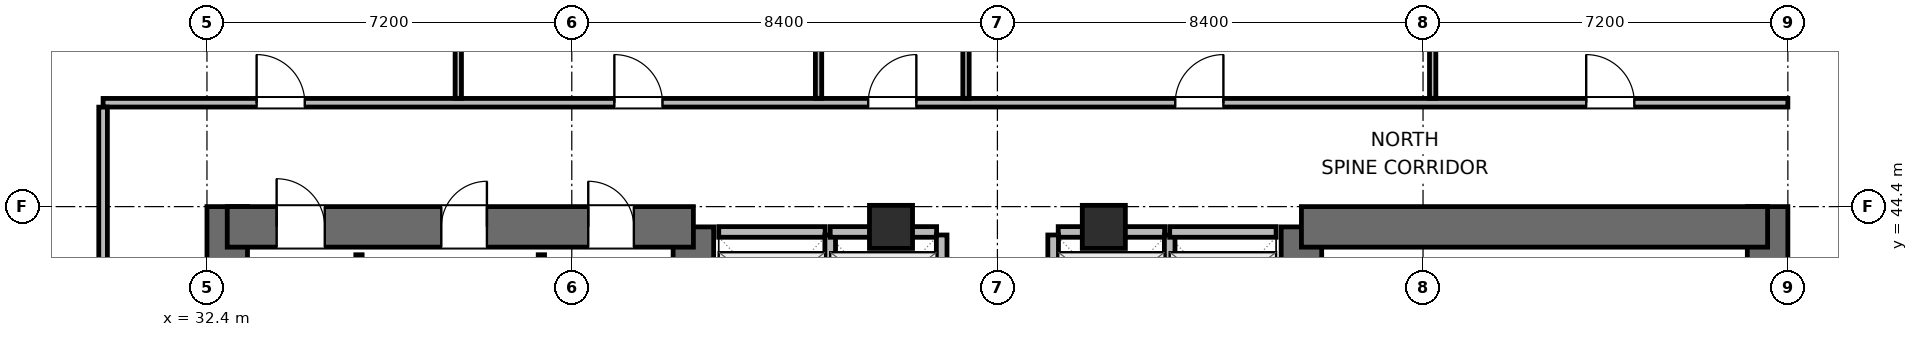
"""IFC4 building model, lengths in metres.
Left out: names, types, materials, properties, quantities, classifications, styles, units other than length and angle.
Written with IfcOpenShell. Run it as: python <this file> out.ifc"""

import sys

from ifc_helpers import new_model, si_unit, direction, frame, frame_2d, origin, origin_2d, place, context, subcontext, project, spatial, rectangle, extrude, element, fill, save


model = new_model("IFC4")
c1 = context("Model", 3, precision=1e-05, world=origin(), true_north=direction((0.0, 1.0)))
c2 = subcontext(c1, "Body", "Model", "MODEL_VIEW")
j1 = project(units=[si_unit("LENGTHUNIT", "METRE"), si_unit("PLANEANGLEUNIT", "RADIAN")], contexts=[c1])
p1 = place(None, origin())
s1 = spatial("IfcSite", under=j1, at=p1, CompositionType="ELEMENT")
p2 = place(p1, origin())
s2 = spatial("IfcBuilding", under=s1, at=p2, CompositionType="ELEMENT")
p3 = place(p2, frame((0.0, 0.0, 133.8)))
s3 = spatial("IfcBuildingStorey", under=s2, at=p3, CompositionType="ELEMENT", Elevation=133.8)
p4 = place(p3, frame((32.8, 27.6, 0.0), z_axis=(0.0, 0.0, 1.0), x_axis=(0.0, 1.0, 0.0)))
e1 = element("IfcWall", 1, at=p4, inside=s3, PredefinedType="SHEAR", context=c2, shape_type="SweptSolid", body=[
    extrude(rectangle(XDim=16.8, YDim=0.8, at=frame_2d((8.4, 0.0))), origin(), (0.0, 0.0, 1.0), 3.9),
])
p5 = place(p3, frame((42.0, 37.8, 0.0), z_axis=(0.0, 0.0, 1.0), x_axis=(0.0, 1.0, 0.0)))
e2 = element("IfcWall", 2, at=p5, inside=s3, PredefinedType="SHEAR", context=c2, shape_type="SweptSolid", body=[
    extrude(rectangle(XDim=6.2, YDim=0.8, at=frame_2d((3.1, 0.0))), origin(), (0.0, 0.0, 1.0), 3.9),
])
p6 = place(p3, frame((32.8, 44.0, 0.0), z_axis=(0.0, 0.0, 1.0), x_axis=(1.0, 0.0, 0.0)))
e3 = element("IfcWall", 3, at=p6, inside=s3, PredefinedType="SHEAR", context=c2, shape_type="SweptSolid", body=[
    extrude(rectangle(XDim=9.2, YDim=0.8, at=frame_2d((4.6, 0.0))), origin(), (0.0, 0.0, 1.0), 3.9),
])
p7 = place(p6, frame((0.975, 0.0, 0.0)))
e4 = element("IfcOpeningElement", 4, at=p7, cuts=e3, PredefinedType="OPENING", context=c2, shape_type="SweptSolid", body=[
    extrude(rectangle(XDim=0.95, YDim=2.04, at=frame_2d((0.475, 1.02))), frame((0.0, 0.41, 0.0), z_axis=(0.0, -1.0, 0.0), x_axis=(1.0, 0.0, 0.0)), (0.0, 0.0, 1.0), 0.82),
])
p8 = place(p6, frame((4.225, 0.0, 0.0)))
e5 = element("IfcOpeningElement", 5, at=p8, cuts=e3, PredefinedType="OPENING", context=c2, shape_type="SweptSolid", body=[
    extrude(rectangle(XDim=0.9, YDim=2.02, at=frame_2d((0.45, 1.01))), frame((0.0, 0.41, 0.0), z_axis=(0.0, -1.0, 0.0), x_axis=(1.0, 0.0, 0.0)), (0.0, 0.0, 1.0), 0.82),
])
p9 = place(p6, frame((7.125, 0.0, 0.0)))
e6 = element("IfcOpeningElement", 6, at=p9, cuts=e3, PredefinedType="OPENING", context=c2, shape_type="SweptSolid", body=[
    extrude(rectangle(XDim=0.9, YDim=2.02, at=frame_2d((0.45, 1.01))), frame((0.0, 0.41, 0.0), z_axis=(0.0, -1.0, 0.0), x_axis=(1.0, 0.0, 0.0)), (0.0, 0.0, 1.0), 0.82),
])
p10 = place(p3, frame((54.0, 38.0, 0.0), z_axis=(0.0, 0.0, 1.0), x_axis=(0.0, 1.0, 0.0)))
e7 = element("IfcWall", 7, at=p10, inside=s3, PredefinedType="SHEAR", context=c2, shape_type="SweptSolid", body=[
    extrude(rectangle(XDim=6.0, YDim=0.8, at=frame_2d((3.0, 0.0))), origin(), (0.0, 0.0, 1.0), 3.9),
])
p11 = place(p3, frame((63.2, 27.6, 0.0), z_axis=(0.0, 0.0, 1.0), x_axis=(0.0, 1.0, 0.0)))
e8 = element("IfcWall", 8, at=p11, inside=s3, PredefinedType="SHEAR", context=c2, shape_type="SweptSolid", body=[
    extrude(rectangle(XDim=16.8, YDim=0.8, at=frame_2d((8.4, 0.0))), origin(), (0.0, 0.0, 1.0), 3.9),
])
p12 = place(p3, frame((54.0, 44.0, 0.0), z_axis=(0.0, 0.0, 1.0), x_axis=(1.0, 0.0, 0.0)))
e9 = element("IfcWall", 9, at=p12, inside=s3, PredefinedType="SHEAR", context=c2, shape_type="SweptSolid", body=[
    extrude(rectangle(XDim=9.2, YDim=0.8, at=frame_2d((4.6, 0.0))), origin(), (0.0, 0.0, 1.0), 3.9),
])
for number, where, z_axis, x_axis in (
    (10, (45.9, 44.0, 0.0), (0.0, 0.0, 1.0), (1.0, 0.0, 0.0)),
    (11, (50.1, 44.0, 0.0), (0.0, 0.0, 1.0), (1.0, 0.0, 0.0)),
):
    element("IfcColumn", number, at=place(p3, frame(where, z_axis=z_axis, x_axis=x_axis)), inside=s3, PredefinedType="COLUMN", context=c2, shape_type="SweptSolid", body=[
        extrude(rectangle(XDim=0.85, YDim=0.85, at=origin_2d()), origin(), (0.0, 0.0, 1.0), 3.9),
    ])
for number, where, z_axis, x_axis in (
    (12, (35.4, 41.095, 0.0), (0.0, 0.0, 1.0), (0.0, 1.0, 0.0)),
    (13, (39.0, 41.095, 0.0), (0.0, 0.0, 1.0), (0.0, 1.0, 0.0)),
):
    element("IfcWall", number, at=place(p3, frame(where, z_axis=z_axis, x_axis=x_axis)), inside=s3, PredefinedType="PARTITIONING", context=c2, shape_type="SweptSolid", body=[
        extrude(rectangle(XDim=2.355, YDim=0.125, at=frame_2d((1.177, 0.0))), origin(), (0.0, 0.0, 1.0), 3.64),
    ])
p13 = place(p3, frame((42.5, 43.9, 0.0), z_axis=(0.0, 0.0, 1.0), x_axis=(1.0, 0.0, 0.0)))
e14 = element("IfcWall", 14, at=p13, inside=s3, PredefinedType="PARTITIONING", context=c2, shape_type="SweptSolid", body=[
    extrude(rectangle(XDim=2.1, YDim=0.21, at=frame_2d((1.05, 0.0))), origin(), (0.0, 0.0, 1.0), 2.525),
])
p14 = place(p3, frame((44.7, 41.56, 0.0), z_axis=(0.0, 0.0, 1.0), x_axis=(0.0, 1.0, 0.0)))
e15 = element("IfcWall", 15, at=p14, inside=s3, PredefinedType="PARTITIONING", context=c2, shape_type="SweptSolid", body=[
    extrude(rectangle(XDim=2.28, YDim=0.21, at=frame_2d((1.14, 0.0))), origin(), (0.0, 0.0, 1.0), 3.64),
])
p15 = place(p3, frame((44.7, 43.9, 0.0), z_axis=(0.0, 0.0, 1.0), x_axis=(1.0, 0.0, 0.0)))
e16 = element("IfcWall", 16, at=p15, inside=s3, PredefinedType="PARTITIONING", context=c2, shape_type="SweptSolid", body=[
    extrude(rectangle(XDim=2.1, YDim=0.21, at=frame_2d((1.05, 0.0))), origin(), (0.0, 0.0, 1.0), 2.525),
])
p16 = place(p3, frame((46.9, 41.56, 0.0), z_axis=(0.0, 0.0, 1.0), x_axis=(0.0, 1.0, 0.0)))
e17 = element("IfcWall", 17, at=p16, inside=s3, PredefinedType="PARTITIONING", context=c2, shape_type="SweptSolid", body=[
    extrude(rectangle(XDim=2.28, YDim=0.21, at=frame_2d((1.14, 0.0))), origin(), (0.0, 0.0, 1.0), 3.64),
])
p17 = place(p3, frame((49.2, 43.9, 0.0), z_axis=(0.0, 0.0, 1.0), x_axis=(1.0, 0.0, 0.0)))
e18 = element("IfcWall", 18, at=p17, inside=s3, PredefinedType="PARTITIONING", context=c2, shape_type="SweptSolid", body=[
    extrude(rectangle(XDim=2.1, YDim=0.21, at=frame_2d((1.05, 0.0))), origin(), (0.0, 0.0, 1.0), 2.525),
])
for number, where, z_axis, x_axis in (
    (19, (49.1, 41.56, 0.0), (0.0, 0.0, 1.0), (0.0, 1.0, 0.0)),
    (20, (51.4, 41.56, 0.0), (0.0, 0.0, 1.0), (0.0, 1.0, 0.0)),
):
    element("IfcWall", number, at=place(p3, frame(where, z_axis=z_axis, x_axis=x_axis)), inside=s3, PredefinedType="PARTITIONING", context=c2, shape_type="SweptSolid", body=[
        extrude(rectangle(XDim=2.28, YDim=0.21, at=frame_2d((1.14, 0.0))), origin(), (0.0, 0.0, 1.0), 3.64),
    ])
p18 = place(p3, frame((51.4, 43.9, 0.0), z_axis=(0.0, 0.0, 1.0), x_axis=(1.0, 0.0, 0.0)))
e21 = element("IfcWall", 21, at=p18, inside=s3, PredefinedType="PARTITIONING", context=c2, shape_type="SweptSolid", body=[
    extrude(rectangle(XDim=2.1, YDim=0.21, at=frame_2d((1.05, 0.0))), origin(), (0.0, 0.0, 1.0), 2.525),
])
p19 = place(p3, frame((30.35, 46.45, 0.0), z_axis=(0.0, 0.0, 1.0), x_axis=(1.0, 0.0, 0.0)))
e22 = element("IfcWall", 22, at=p19, inside=s3, PredefinedType="PARTITIONING", context=c2, shape_type="SweptSolid", body=[
    extrude(rectangle(XDim=33.25, YDim=0.17, at=frame_2d((16.625, 0.0))), origin(), (0.0, 0.0, 1.0), 3.64),
])
p20 = place(p19, frame((3.03, 0.0, 0.0)))
e23 = element("IfcOpeningElement", 23, at=p20, cuts=e22, PredefinedType="OPENING", context=c2, shape_type="SweptSolid", body=[
    extrude(rectangle(XDim=0.95, YDim=2.04, at=frame_2d((0.475, 1.02))), frame((0.0, 0.095, 0.0), z_axis=(0.0, -1.0, 0.0), x_axis=(1.0, 0.0, 0.0)), (0.0, 0.0, 1.0), 0.19),
])
p21 = place(p19, frame((10.09, 0.0, 0.0)))
e24 = element("IfcOpeningElement", 24, at=p21, cuts=e22, PredefinedType="OPENING", context=c2, shape_type="SweptSolid", body=[
    extrude(rectangle(XDim=0.95, YDim=2.04, at=frame_2d((0.475, 1.02))), frame((0.0, 0.095, 0.0), z_axis=(0.0, -1.0, 0.0), x_axis=(1.0, 0.0, 0.0)), (0.0, 0.0, 1.0), 0.19),
])
p22 = place(p19, frame((15.1, 0.0, 0.0)))
e25 = element("IfcOpeningElement", 25, at=p22, cuts=e22, PredefinedType="OPENING", context=c2, shape_type="SweptSolid", body=[
    extrude(rectangle(XDim=0.95, YDim=2.04, at=frame_2d((0.475, 1.02))), frame((0.0, 0.095, 0.0), z_axis=(0.0, -1.0, 0.0), x_axis=(1.0, 0.0, 0.0)), (0.0, 0.0, 1.0), 0.19),
])
p23 = place(p19, frame((21.16, 0.0, 0.0)))
e26 = element("IfcOpeningElement", 26, at=p23, cuts=e22, PredefinedType="OPENING", context=c2, shape_type="SweptSolid", body=[
    extrude(rectangle(XDim=0.95, YDim=2.04, at=frame_2d((0.475, 1.02))), frame((0.0, 0.095, 0.0), z_axis=(0.0, -1.0, 0.0), x_axis=(1.0, 0.0, 0.0)), (0.0, 0.0, 1.0), 0.19),
])
p24 = place(p19, frame((29.27, 0.0, 0.0)))
e27 = element("IfcOpeningElement", 27, at=p24, cuts=e22, PredefinedType="OPENING", context=c2, shape_type="SweptSolid", body=[
    extrude(rectangle(XDim=0.95, YDim=2.04, at=frame_2d((0.475, 1.02))), frame((0.0, 0.095, 0.0), z_axis=(0.0, -1.0, 0.0), x_axis=(1.0, 0.0, 0.0)), (0.0, 0.0, 1.0), 0.19),
])
p25 = place(p3, frame((30.35, 37.1, 0.0), z_axis=(0.0, 0.0, 1.0), x_axis=(0.0, 1.0, 0.0)))
e28 = element("IfcWall", 28, at=p25, inside=s3, PredefinedType="PARTITIONING", context=c2, shape_type="SweptSolid", body=[
    extrude(rectangle(XDim=9.263, YDim=0.17, at=frame_2d((4.631, 0.0))), origin(), (0.0, 0.0, 1.0), 3.64),
])
p26 = place(p25, frame((4.2, 0.0, 0.0)))
e29 = element("IfcOpeningElement", 29, at=p26, cuts=e28, PredefinedType="OPENING", context=c2, shape_type="SweptSolid", body=[
    extrude(rectangle(XDim=0.95, YDim=2.04, at=frame_2d((0.475, 1.02))), frame((0.0, 0.095, 0.0), z_axis=(0.0, -1.0, 0.0), x_axis=(1.0, 0.0, 0.0)), (0.0, 0.0, 1.0), 0.19),
])
p27 = place(p3, frame((37.36, 46.537, 0.0), z_axis=(0.0, 0.0, 1.0), x_axis=(0.0, 1.0, 0.0)))
e30 = element("IfcWall", 30, at=p27, inside=s3, PredefinedType="PARTITIONING", context=c2, shape_type="SweptSolid", body=[
    extrude(rectangle(XDim=15.618, YDim=0.125, at=frame_2d((7.809, 0.0))), origin(), (0.0, 0.0, 1.0), 3.64),
])
p28 = place(p3, frame((44.47, 46.537, 0.0), z_axis=(0.0, 0.0, 1.0), x_axis=(0.0, 1.0, 0.0)))
e31 = element("IfcWall", 31, at=p28, inside=s3, PredefinedType="PARTITIONING", context=c2, shape_type="SweptSolid", body=[
    extrude(rectangle(XDim=13.948, YDim=0.125, at=frame_2d((6.974, 0.0))), origin(), (0.0, 0.0, 1.0), 3.003),
])
p29 = place(p3, frame((47.38, 46.537, 0.0), z_axis=(0.0, 0.0, 1.0), x_axis=(0.0, 1.0, 0.0)))
e32 = element("IfcWall", 32, at=p29, inside=s3, PredefinedType="PARTITIONING", context=c2, shape_type="SweptSolid", body=[
    extrude(rectangle(XDim=13.948, YDim=0.125, at=frame_2d((6.974, 0.0))), origin(), (0.0, 0.0, 1.0), 3.64),
])
p30 = place(p3, frame((56.59, 46.537, 0.0), z_axis=(0.0, 0.0, 1.0), x_axis=(0.0, 1.0, 0.0)))
e33 = element("IfcWall", 33, at=p30, inside=s3, PredefinedType="PARTITIONING", context=c2, shape_type="SweptSolid", body=[
    extrude(rectangle(XDim=15.548, YDim=0.125, at=frame_2d((7.774, 0.0))), origin(), (0.0, 0.0, 1.0), 3.003),
])
p31 = place(p7, origin())
e34 = element("IfcDoor", 34, at=p31, inside=s3, OperationType="SINGLE_SWING_LEFT", PredefinedType="DOOR", context=c2, shape_type="SweptSolid", body=[
    extrude(rectangle(XDim=0.95, YDim=2.04, at=frame_2d((0.475, 1.02))), frame((0.0, 0.025, 0.0), z_axis=(0.0, -1.0, 0.0), x_axis=(1.0, 0.0, 0.0)), (0.0, 0.0, 1.0), 0.05),
])
fill(e4, e34)
p32 = place(p8, origin())
e35 = element("IfcDoor", 35, at=p32, inside=s3, OperationType="SINGLE_SWING_RIGHT", PredefinedType="DOOR", context=c2, shape_type="SweptSolid", body=[
    extrude(rectangle(XDim=0.9, YDim=2.02, at=frame_2d((0.45, 1.01))), frame((0.0, 0.025, 0.0), z_axis=(0.0, -1.0, 0.0), x_axis=(1.0, 0.0, 0.0)), (0.0, 0.0, 1.0), 0.05),
])
fill(e5, e35)
p33 = place(p9, origin())
e36 = element("IfcDoor", 36, at=p33, inside=s3, OperationType="SINGLE_SWING_LEFT", PredefinedType="DOOR", context=c2, shape_type="SweptSolid", body=[
    extrude(rectangle(XDim=0.9, YDim=2.02, at=frame_2d((0.45, 1.01))), frame((0.0, 0.025, 0.0), z_axis=(0.0, -1.0, 0.0), x_axis=(1.0, 0.0, 0.0)), (0.0, 0.0, 1.0), 0.05),
])
fill(e6, e36)
p34 = place(p20, origin())
e37 = element("IfcDoor", 37, at=p34, inside=s3, OperationType="SINGLE_SWING_LEFT", PredefinedType="DOOR", context=c2, shape_type="SweptSolid", body=[
    extrude(rectangle(XDim=0.95, YDim=2.04, at=frame_2d((0.475, 1.02))), frame((0.0, 0.025, 0.0), z_axis=(0.0, -1.0, 0.0), x_axis=(1.0, 0.0, 0.0)), (0.0, 0.0, 1.0), 0.05),
])
fill(e23, e37)
p35 = place(p21, origin())
e38 = element("IfcDoor", 38, at=p35, inside=s3, OperationType="SINGLE_SWING_LEFT", PredefinedType="DOOR", context=c2, shape_type="SweptSolid", body=[
    extrude(rectangle(XDim=0.95, YDim=2.04, at=frame_2d((0.475, 1.02))), frame((0.0, 0.025, 0.0), z_axis=(0.0, -1.0, 0.0), x_axis=(1.0, 0.0, 0.0)), (0.0, 0.0, 1.0), 0.05),
])
fill(e24, e38)
p36 = place(p22, origin())
e39 = element("IfcDoor", 39, at=p36, inside=s3, OperationType="SINGLE_SWING_RIGHT", PredefinedType="DOOR", context=c2, shape_type="SweptSolid", body=[
    extrude(rectangle(XDim=0.95, YDim=2.04, at=frame_2d((0.475, 1.02))), frame((0.0, 0.025, 0.0), z_axis=(0.0, -1.0, 0.0), x_axis=(1.0, 0.0, 0.0)), (0.0, 0.0, 1.0), 0.05),
])
fill(e25, e39)
p37 = place(p23, origin())
e40 = element("IfcDoor", 40, at=p37, inside=s3, OperationType="SINGLE_SWING_RIGHT", PredefinedType="DOOR", context=c2, shape_type="SweptSolid", body=[
    extrude(rectangle(XDim=0.95, YDim=2.04, at=frame_2d((0.475, 1.02))), frame((0.0, 0.025, 0.0), z_axis=(0.0, -1.0, 0.0), x_axis=(1.0, 0.0, 0.0)), (0.0, 0.0, 1.0), 0.05),
])
fill(e26, e40)
p38 = place(p24, origin())
e41 = element("IfcDoor", 41, at=p38, inside=s3, OperationType="SINGLE_SWING_LEFT", PredefinedType="DOOR", context=c2, shape_type="SweptSolid", body=[
    extrude(rectangle(XDim=0.95, YDim=2.04, at=frame_2d((0.475, 1.02))), frame((0.0, 0.025, 0.0), z_axis=(0.0, -1.0, 0.0), x_axis=(1.0, 0.0, 0.0)), (0.0, 0.0, 1.0), 0.05),
])
fill(e27, e41)
save(model, sys.argv[1])
